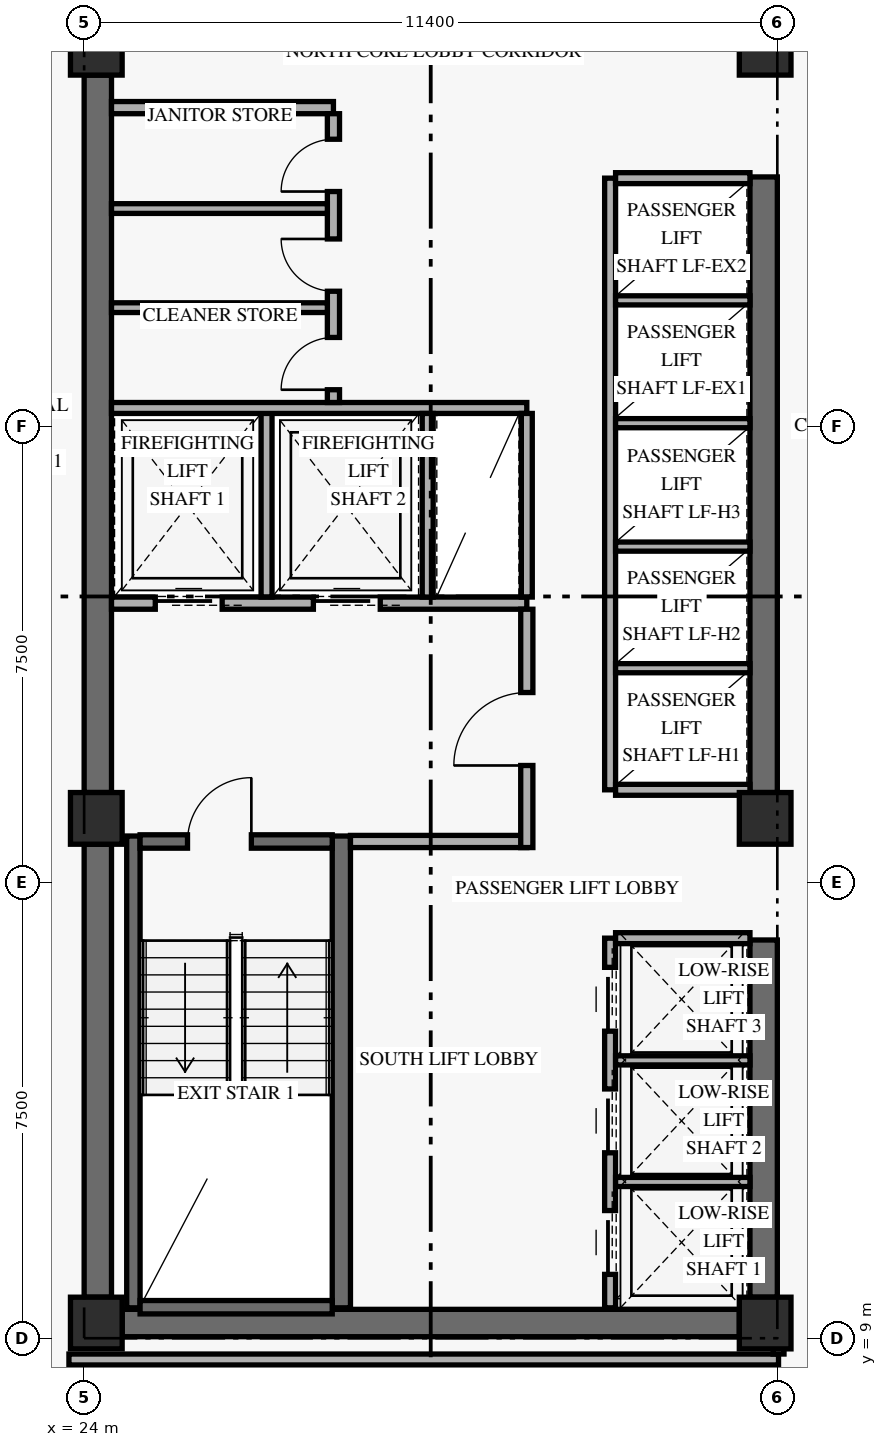
"""IFC4 building model, lengths in metres.
Left out: names, types, materials, properties, quantities, classifications, styles, units other than length and angle.
Written with IfcOpenShell. Run it as: python <this file> out.ifc"""

import sys

from ifc_helpers import new_model, si_unit, direction, frame, frame_2d, origin, origin_2d, place, context, subcontext, project, spatial, rectangle, extrude, element, fill, save


model = new_model("IFC4")
c1 = context("Model", 3, precision=1e-05, world=origin(), true_north=direction((0.0, 1.0)))
c2 = subcontext(c1, "Body", "Model", "MODEL_VIEW")
j1 = project(units=[si_unit("LENGTHUNIT", "METRE"), si_unit("PLANEANGLEUNIT", "RADIAN")], contexts=[c1])
p1 = place(None, origin())
s1 = spatial("IfcSite", under=j1, at=p1, CompositionType="ELEMENT")
p2 = place(p1, origin())
s2 = spatial("IfcBuilding", under=s1, at=p2, CompositionType="ELEMENT")
p3 = place(p2, frame((0.0, 0.0, 42.0)))
s3 = spatial("IfcBuildingStorey", under=s2, at=p3, CompositionType="ELEMENT", Elevation=42.0)
p4 = place(p3, frame((24.225, 9.675, 0.0), z_axis=(0.0, 0.0, 1.0), x_axis=(0.0, 1.0, 0.0)))
e1 = element("IfcWall", 1, at=p4, inside=s3, PredefinedType="SHEAR", context=c2, shape_type="SweptSolid", body=[
    extrude(rectangle(XDim=7.45, YDim=0.45, at=frame_2d((3.725, 0.0))), origin(), (0.0, 0.0, 1.0), 2.667),
])
p5 = place(p3, frame((24.225, 17.975, 0.0), z_axis=(0.0, 0.0, 1.0), x_axis=(0.0, 1.0, 0.0)))
e2 = element("IfcWall", 2, at=p5, inside=s3, PredefinedType="SHEAR", context=c2, shape_type="SweptSolid", body=[
    extrude(rectangle(XDim=11.8, YDim=0.45, at=frame_2d((5.9, 0.0))), origin(), (0.0, 0.0, 1.0), 2.667),
])
p6 = place(p3, frame((35.175, 9.675, 0.0), z_axis=(0.0, 0.0, 1.0), x_axis=(0.0, 1.0, 0.0)))
e3 = element("IfcWall", 3, at=p6, inside=s3, PredefinedType="SHEAR", context=c2, shape_type="SweptSolid", body=[
    extrude(rectangle(XDim=5.875, YDim=0.45, at=frame_2d((2.938, 0.0))), origin(), (0.0, 0.0, 1.0), 2.667),
])
p7 = place(p3, frame((35.175, 17.975, 0.0), z_axis=(0.0, 0.0, 1.0), x_axis=(0.0, 1.0, 0.0)))
e4 = element("IfcWall", 4, at=p7, inside=s3, PredefinedType="SHEAR", context=c2, shape_type="SweptSolid", body=[
    extrude(rectangle(XDim=10.125, YDim=0.45, at=frame_2d((5.062, 0.0))), origin(), (0.0, 0.0, 1.0), 2.667),
])
p8 = place(p3, frame((24.625, 9.25, 0.0), z_axis=(0.0, 0.0, 1.0), x_axis=(1.0, 0.0, 0.0)))
e5 = element("IfcWall", 5, at=p8, inside=s3, PredefinedType="SHEAR", context=c2, shape_type="SweptSolid", body=[
    extrude(rectangle(XDim=10.15, YDim=0.45, at=frame_2d((5.075, 0.0))), origin(), (0.0, 0.0, 1.0), 3.36),
])
p9 = place(p3, frame((24.81, 9.5, 0.0), z_axis=(0.0, 0.0, 1.0), x_axis=(0.0, 1.0, 0.0)))
e6 = element("IfcWall", 6, at=p9, inside=s3, PredefinedType="SHEAR", context=c2, shape_type="SweptSolid", body=[
    extrude(rectangle(XDim=7.76, YDim=0.22, at=frame_2d((3.88, 0.0))), origin(), (0.0, 0.0, 1.0), 3.36),
])
p10 = place(p3, frame((28.23, 9.5, 0.0), z_axis=(0.0, 0.0, 1.0), x_axis=(0.0, 1.0, 0.0)))
e7 = element("IfcWall", 7, at=p10, inside=s3, PredefinedType="SHEAR", context=c2, shape_type="SweptSolid", body=[
    extrude(rectangle(XDim=7.76, YDim=0.3, at=frame_2d((3.88, 0.0))), origin(), (0.0, 0.0, 1.0), 3.36),
])
p11 = place(p3, frame((24.92, 9.51, 0.0), z_axis=(0.0, 0.0, 1.0), x_axis=(1.0, 0.0, 0.0)))
e8 = element("IfcWall", 8, at=p11, inside=s3, PredefinedType="SHEAR", context=c2, shape_type="SweptSolid", body=[
    extrude(rectangle(XDim=3.16, YDim=0.22, at=frame_2d((1.58, 0.0))), origin(), (0.0, 0.0, 1.0), 3.36),
])
p12 = place(p3, frame((24.92, 17.17, 0.0), z_axis=(0.0, 0.0, 1.0), x_axis=(1.0, 0.0, 0.0)))
e9 = element("IfcWall", 9, at=p12, inside=s3, PredefinedType="SHEAR", context=c2, shape_type="SweptSolid", body=[
    extrude(rectangle(XDim=3.16, YDim=0.22, at=frame_2d((1.58, 0.0))), origin(), (0.0, 0.0, 1.0), 3.36),
])
p13 = place(p12, frame((0.78, 0.0, 0.0)))
e10 = element("IfcOpeningElement", 10, at=p13, cuts=e9, PredefinedType="OPENING", context=c2, shape_type="SweptSolid", body=[
    extrude(rectangle(XDim=1.05, YDim=2.15, at=frame_2d((0.525, 1.075))), frame((0.0, 0.12, 0.0), z_axis=(0.0, -1.0, 0.0), x_axis=(1.0, 0.0, 0.0)), (0.0, 0.0, 1.0), 0.24),
])
for number, where, z_axis, x_axis in (
    (11, (24.2, 9.25, 0.0), (0.0, 0.0, 1.0), (1.0, 0.0, 0.0)),
    (12, (24.2, 17.55, 0.0), (0.0, 0.0, 1.0), (1.0, 0.0, 0.0)),
    (13, (24.2, 30.2, 0.0), (0.0, 0.0, 1.0), (1.0, 0.0, 0.0)),
    (14, (35.2, 9.25, 0.0), (0.0, 0.0, 1.0), (1.0, 0.0, 0.0)),
    (15, (35.2, 17.55, 0.0), (0.0, 0.0, 1.0), (1.0, 0.0, 0.0)),
    (16, (35.2, 30.2, 0.0), (0.0, 0.0, 1.0), (1.0, 0.0, 0.0)),
):
    element("IfcColumn", number, at=place(p3, frame(where, z_axis=z_axis, x_axis=x_axis)), inside=s3, PredefinedType="COLUMN", context=c2, shape_type="SweptSolid", body=[
        extrude(rectangle(XDim=0.85, YDim=0.85, at=origin_2d()), origin(), (0.0, 0.0, 1.0), 3.6),
    ])
p14 = place(p3, frame((24.45, 21.09, 0.0), z_axis=(0.0, 0.0, 1.0), x_axis=(1.0, 0.0, 0.0)))
e17 = element("IfcWall", 17, at=p14, inside=s3, PredefinedType="STANDARD", context=c2, shape_type="SweptSolid", body=[
    extrude(rectangle(XDim=6.83, YDim=0.2, at=frame_2d((3.415, 0.0))), origin(), (0.0, 0.0, 1.0), 3.36),
])
p15 = place(p14, frame((0.72, 0.0, 0.0)))
e18 = element("IfcOpeningElement", 18, at=p15, cuts=e17, PredefinedType="OPENING", context=c2, shape_type="SweptSolid", body=[
    extrude(rectangle(XDim=1.1, YDim=2.2, at=frame_2d((0.55, 1.1))), frame((0.0, 0.11, 0.0), z_axis=(0.0, -1.0, 0.0), x_axis=(1.0, 0.0, 0.0)), (0.0, 0.0, 1.0), 0.22),
])
p16 = place(p14, frame((3.32, 0.0, 0.0)))
e19 = element("IfcOpeningElement", 19, at=p16, cuts=e17, PredefinedType="OPENING", context=c2, shape_type="SweptSolid", body=[
    extrude(rectangle(XDim=1.1, YDim=2.2, at=frame_2d((0.55, 1.1))), frame((0.0, 0.11, 0.0), z_axis=(0.0, -1.0, 0.0), x_axis=(1.0, 0.0, 0.0)), (0.0, 0.0, 1.0), 0.22),
])
p17 = place(p3, frame((28.38, 17.17, 0.0), z_axis=(0.0, 0.0, 1.0), x_axis=(1.0, 0.0, 0.0)))
e20 = element("IfcWall", 20, at=p17, inside=s3, PredefinedType="STANDARD", context=c2, shape_type="SweptSolid", body=[
    extrude(rectangle(XDim=2.9, YDim=0.2, at=frame_2d((1.45, 0.0))), origin(), (0.0, 0.0, 1.0), 3.36),
])
p18 = place(p3, frame((31.28, 17.07, 0.0), z_axis=(0.0, 0.0, 1.0), x_axis=(0.0, 1.0, 0.0)))
e21 = element("IfcWall", 21, at=p18, inside=s3, PredefinedType="STANDARD", context=c2, shape_type="SweptSolid", body=[
    extrude(rectangle(XDim=3.92, YDim=0.2, at=frame_2d((1.96, 0.0))), origin(), (0.0, 0.0, 1.0), 2.649),
])
p19 = place(p18, frame((1.35, 0.0, 0.0)))
e22 = element("IfcOpeningElement", 22, at=p19, cuts=e21, PredefinedType="OPENING", context=c2, shape_type="SweptSolid", body=[
    extrude(rectangle(XDim=1.2, YDim=2.15, at=frame_2d((0.6, 1.075))), frame((0.0, 0.11, 0.0), z_axis=(0.0, -1.0, 0.0), x_axis=(1.0, 0.0, 0.0)), (0.0, 0.0, 1.0), 0.22),
])
p20 = place(p3, frame((27.0, 21.19, 0.0), z_axis=(0.0, 0.0, 1.0), x_axis=(0.0, 1.0, 0.0)))
e23 = element("IfcWall", 23, at=p20, inside=s3, PredefinedType="STANDARD", context=c2, shape_type="SweptSolid", body=[
    extrude(rectangle(XDim=3.11, YDim=0.18, at=frame_2d((1.555, 0.0))), origin(), (0.0, 0.0, 1.0), 3.36),
])
p21 = place(p3, frame((24.45, 24.3, 0.0), z_axis=(0.0, 0.0, 1.0), x_axis=(1.0, 0.0, 0.0)))
e24 = element("IfcWall", 24, at=p21, inside=s3, PredefinedType="STANDARD", context=c2, shape_type="SweptSolid", body=[
    extrude(rectangle(XDim=6.83, YDim=0.18, at=frame_2d((3.415, 0.0))), origin(), (0.0, 0.0, 1.0), 3.36),
])
for number, where, z_axis, x_axis in (
    (25, (29.65, 21.19, 0.0), (0.0, 0.0, 1.0), (0.0, 1.0, 0.0)),
    (26, (31.28, 21.19, 0.0), (0.0, 0.0, 1.0), (0.0, 1.0, 0.0)),
):
    element("IfcWall", number, at=place(p3, frame(where, z_axis=z_axis, x_axis=x_axis)), inside=s3, PredefinedType="STANDARD", context=c2, shape_type="SweptSolid", body=[
        extrude(rectangle(XDim=3.02, YDim=0.18, at=frame_2d((1.51, 0.0))), origin(), (0.0, 0.0, 1.0), 3.36),
    ])
p22 = place(p3, frame((24.45, 29.24, 0.0), z_axis=(0.0, 0.0, 1.0), x_axis=(1.0, 0.0, 0.0)))
e27 = element("IfcWall", 27, at=p22, inside=s3, PredefinedType="STANDARD", context=c2, shape_type="SweptSolid", body=[
    extrude(rectangle(XDim=3.65, YDim=0.2, at=frame_2d((1.825, 0.0))), origin(), (0.0, 0.0, 1.0), 3.36),
])
p23 = place(p3, frame((28.1, 24.39, 0.0), z_axis=(0.0, 0.0, 1.0), x_axis=(0.0, 1.0, 0.0)))
e28 = element("IfcWall", 28, at=p23, inside=s3, PredefinedType="STANDARD", context=c2, shape_type="SweptSolid", body=[
    extrude(rectangle(XDim=4.75, YDim=0.2, at=frame_2d((2.375, 0.0))), origin(), (0.0, 0.0, 1.0), 3.36),
])
p24 = place(p23, frame((0.21, 0.0, 0.0)))
e29 = element("IfcOpeningElement", 29, at=p24, cuts=e28, PredefinedType="OPENING", context=c2, shape_type="SweptSolid", body=[
    extrude(rectangle(XDim=0.86, YDim=2.1, at=frame_2d((0.43, 1.05))), frame((0.0, 0.11, 0.0), z_axis=(0.0, -1.0, 0.0), x_axis=(1.0, 0.0, 0.0)), (0.0, 0.0, 1.0), 0.22),
])
p25 = place(p23, frame((1.83, 0.0, 0.0)))
e30 = element("IfcOpeningElement", 30, at=p25, cuts=e28, PredefinedType="OPENING", context=c2, shape_type="SweptSolid", body=[
    extrude(rectangle(XDim=0.86, YDim=2.1, at=frame_2d((0.43, 1.05))), frame((0.0, 0.11, 0.0), z_axis=(0.0, -1.0, 0.0), x_axis=(1.0, 0.0, 0.0)), (0.0, 0.0, 1.0), 0.22),
])
p26 = place(p23, frame((3.47, 0.0, 0.0)))
e31 = element("IfcOpeningElement", 31, at=p26, cuts=e28, PredefinedType="OPENING", context=c2, shape_type="SweptSolid", body=[
    extrude(rectangle(XDim=0.86, YDim=2.1, at=frame_2d((0.43, 1.05))), frame((0.0, 0.11, 0.0), z_axis=(0.0, -1.0, 0.0), x_axis=(1.0, 0.0, 0.0)), (0.0, 0.0, 1.0), 0.22),
])
for number, where, z_axis, x_axis in (
    (32, (24.45, 25.95, 0.0), (0.0, 0.0, 1.0), (1.0, 0.0, 0.0)),
    (33, (24.45, 27.58, 0.0), (0.0, 0.0, 1.0), (1.0, 0.0, 0.0)),
):
    element("IfcWall", number, at=place(p3, frame(where, z_axis=z_axis, x_axis=x_axis)), inside=s3, PredefinedType="PARTITIONING", context=c2, shape_type="SweptSolid", body=[
        extrude(rectangle(XDim=3.55, YDim=0.16, at=frame_2d((1.775, 0.0))), origin(), (0.0, 0.0, 1.0), 3.36),
    ])
p27 = place(p3, frame((32.65, 9.5, 0.0), z_axis=(0.0, 0.0, 1.0), x_axis=(0.0, 1.0, 0.0)))
e34 = element("IfcWall", 34, at=p27, inside=s3, PredefinedType="STANDARD", context=c2, shape_type="SweptSolid", body=[
    extrude(rectangle(XDim=6.08, YDim=0.18, at=frame_2d((3.04, 0.0))), origin(), (0.0, 0.0, 1.0), 3.36),
])
p28 = place(p27, frame((0.55, 0.0, 0.0)))
e35 = element("IfcOpeningElement", 35, at=p28, cuts=e34, PredefinedType="OPENING", context=c2, shape_type="SweptSolid", body=[
    extrude(rectangle(XDim=1.05, YDim=2.2, at=frame_2d((0.525, 1.1))), frame((0.0, 0.1, 0.0), z_axis=(0.0, -1.0, 0.0), x_axis=(1.0, 0.0, 0.0)), (0.0, 0.0, 1.0), 0.2),
])
p29 = place(p27, frame((2.55, 0.0, 0.0)))
e36 = element("IfcOpeningElement", 36, at=p29, cuts=e34, PredefinedType="OPENING", context=c2, shape_type="SweptSolid", body=[
    extrude(rectangle(XDim=1.05, YDim=2.2, at=frame_2d((0.525, 1.1))), frame((0.0, 0.1, 0.0), z_axis=(0.0, -1.0, 0.0), x_axis=(1.0, 0.0, 0.0)), (0.0, 0.0, 1.0), 0.2),
])
p30 = place(p27, frame((4.55, 0.0, 0.0)))
e37 = element("IfcOpeningElement", 37, at=p30, cuts=e34, PredefinedType="OPENING", context=c2, shape_type="SweptSolid", body=[
    extrude(rectangle(XDim=1.05, YDim=2.2, at=frame_2d((0.525, 1.1))), frame((0.0, 0.1, 0.0), z_axis=(0.0, -1.0, 0.0), x_axis=(1.0, 0.0, 0.0)), (0.0, 0.0, 1.0), 0.2),
])
p31 = place(p3, frame((32.74, 15.58, 0.0), z_axis=(0.0, 0.0, 1.0), x_axis=(1.0, 0.0, 0.0)))
e38 = element("IfcWall", 38, at=p31, inside=s3, PredefinedType="STANDARD", context=c2, shape_type="SweptSolid", body=[
    extrude(rectangle(XDim=2.21, YDim=0.18, at=frame_2d((1.105, 0.0))), origin(), (0.0, 0.0, 1.0), 3.36),
])
for number, where, z_axis, x_axis in (
    (39, (32.74, 11.57, 0.0), (0.0, 0.0, 1.0), (1.0, 0.0, 0.0)),
    (40, (32.74, 13.57, 0.0), (0.0, 0.0, 1.0), (1.0, 0.0, 0.0)),
):
    element("IfcWall", number, at=place(p3, frame(where, z_axis=z_axis, x_axis=x_axis)), inside=s3, PredefinedType="STANDARD", context=c2, shape_type="SweptSolid", body=[
        extrude(rectangle(XDim=2.21, YDim=0.15, at=frame_2d((1.105, 0.0))), origin(), (0.0, 0.0, 1.0), 3.36),
    ])
p32 = place(p3, frame((32.65, 18.02, 0.0), z_axis=(0.0, 0.0, 1.0), x_axis=(0.0, 1.0, 0.0)))
e41 = element("IfcWall", 41, at=p32, inside=s3, PredefinedType="STANDARD", context=c2, shape_type="SweptSolid", body=[
    extrude(rectangle(XDim=10.06, YDim=0.18, at=frame_2d((5.03, 0.0))), origin(), (0.0, 0.0, 1.0), 3.36),
])
for number, where, z_axis, x_axis in (
    (42, (32.74, 18.02, 0.0), (0.0, 0.0, 1.0), (1.0, 0.0, 0.0)),
    (43, (32.74, 28.08, 0.0), (0.0, 0.0, 1.0), (1.0, 0.0, 0.0)),
):
    element("IfcWall", number, at=place(p3, frame(where, z_axis=z_axis, x_axis=x_axis)), inside=s3, PredefinedType="STANDARD", context=c2, shape_type="SweptSolid", body=[
        extrude(rectangle(XDim=2.21, YDim=0.18, at=frame_2d((1.105, 0.0))), origin(), (0.0, 0.0, 1.0), 3.36),
    ])
for number, where, z_axis, x_axis in (
    (44, (32.74, 20.02, 0.0), (0.0, 0.0, 1.0), (1.0, 0.0, 0.0)),
    (45, (32.74, 22.02, 0.0), (0.0, 0.0, 1.0), (1.0, 0.0, 0.0)),
    (46, (32.74, 24.05, 0.0), (0.0, 0.0, 1.0), (1.0, 0.0, 0.0)),
    (47, (32.74, 26.07, 0.0), (0.0, 0.0, 1.0), (1.0, 0.0, 0.0)),
):
    element("IfcWall", number, at=place(p3, frame(where, z_axis=z_axis, x_axis=x_axis)), inside=s3, PredefinedType="STANDARD", context=c2, shape_type="SweptSolid", body=[
        extrude(rectangle(XDim=2.21, YDim=0.15, at=frame_2d((1.105, 0.0))), origin(), (0.0, 0.0, 1.0), 3.36),
    ])
p33 = place(p3, frame((23.75, 8.65, 0.0), z_axis=(0.0, 0.0, 1.0), x_axis=(1.0, 0.0, 0.0)))
e48 = element("IfcWall", 48, at=p33, inside=s3, PredefinedType="STANDARD", context=c2, shape_type="SweptSolid", body=[
    extrude(rectangle(XDim=11.67, YDim=0.18, at=frame_2d((5.835, 0.0))), origin(), (0.0, 0.0, 1.0), 2.649),
])
p34 = place(p3, frame((35.42, 8.74, 0.0), z_axis=(0.0, 0.0, 1.0), x_axis=(0.0, 1.0, 0.0)))
e49 = element("IfcWall", 49, at=p34, inside=s3, PredefinedType="STANDARD", context=c2, shape_type="SweptSolid", body=[
    extrude(rectangle(XDim=0.51, YDim=0.18, at=frame_2d((0.255, 0.0))), origin(), (0.0, 0.0, 1.0), 3.36),
])
p35 = place(p13, frame((1.05, 0.0, 0.0), z_axis=(0.0, 0.0, 1.0), x_axis=(-1.0, 0.0, 0.0)))
e50 = element("IfcDoor", 50, at=p35, inside=s3, OperationType="SINGLE_SWING_LEFT", PredefinedType="DOOR", context=c2, shape_type="SweptSolid", body=[
    extrude(rectangle(XDim=1.05, YDim=2.15, at=frame_2d((0.525, 1.075))), frame((0.0, 0.025, 0.0), z_axis=(0.0, -1.0, 0.0), x_axis=(1.0, 0.0, 0.0)), (0.0, 0.0, 1.0), 0.05),
])
fill(e10, e50)
p36 = place(p15, origin())
e51 = element("IfcDoor", 51, at=p36, inside=s3, OperationType="SLIDING_TO_LEFT", PredefinedType="DOOR", context=c2, shape_type="SweptSolid", body=[
    extrude(rectangle(XDim=1.1, YDim=2.2, at=frame_2d((0.55, 1.1))), frame((0.0, 0.025, 0.0), z_axis=(0.0, -1.0, 0.0), x_axis=(1.0, 0.0, 0.0)), (0.0, 0.0, 1.0), 0.05),
])
fill(e18, e51)
p37 = place(p16, origin())
e52 = element("IfcDoor", 52, at=p37, inside=s3, OperationType="SLIDING_TO_LEFT", PredefinedType="DOOR", context=c2, shape_type="SweptSolid", body=[
    extrude(rectangle(XDim=1.1, YDim=2.2, at=frame_2d((0.55, 1.1))), frame((0.0, 0.025, 0.0), z_axis=(0.0, -1.0, 0.0), x_axis=(1.0, 0.0, 0.0)), (0.0, 0.0, 1.0), 0.05),
])
fill(e19, e52)
p38 = place(p19, origin())
e53 = element("IfcDoor", 53, at=p38, inside=s3, OperationType="SINGLE_SWING_LEFT", PredefinedType="DOOR", context=c2, shape_type="SweptSolid", body=[
    extrude(rectangle(XDim=1.2, YDim=2.15, at=frame_2d((0.6, 1.075))), frame((0.0, 0.025, 0.0), z_axis=(0.0, -1.0, 0.0), x_axis=(1.0, 0.0, 0.0)), (0.0, 0.0, 1.0), 0.05),
])
fill(e22, e53)
p39 = place(p24, origin())
e54 = element("IfcDoor", 54, at=p39, inside=s3, OperationType="SINGLE_SWING_LEFT", PredefinedType="DOOR", context=c2, shape_type="SweptSolid", body=[
    extrude(rectangle(XDim=0.86, YDim=2.1, at=frame_2d((0.43, 1.05))), frame((0.0, 0.025, 0.0), z_axis=(0.0, -1.0, 0.0), x_axis=(1.0, 0.0, 0.0)), (0.0, 0.0, 1.0), 0.05),
])
fill(e29, e54)
p40 = place(p25, origin())
e55 = element("IfcDoor", 55, at=p40, inside=s3, OperationType="SINGLE_SWING_RIGHT", PredefinedType="DOOR", context=c2, shape_type="SweptSolid", body=[
    extrude(rectangle(XDim=0.86, YDim=2.1, at=frame_2d((0.43, 1.05))), frame((0.0, 0.025, 0.0), z_axis=(0.0, -1.0, 0.0), x_axis=(1.0, 0.0, 0.0)), (0.0, 0.0, 1.0), 0.05),
])
fill(e30, e55)
p41 = place(p26, origin())
e56 = element("IfcDoor", 56, at=p41, inside=s3, OperationType="SINGLE_SWING_LEFT", PredefinedType="DOOR", context=c2, shape_type="SweptSolid", body=[
    extrude(rectangle(XDim=0.86, YDim=2.1, at=frame_2d((0.43, 1.05))), frame((0.0, 0.025, 0.0), z_axis=(0.0, -1.0, 0.0), x_axis=(1.0, 0.0, 0.0)), (0.0, 0.0, 1.0), 0.05),
])
fill(e31, e56)
p42 = place(p28, origin())
e57 = element("IfcDoor", 57, at=p42, inside=s3, OperationType="SLIDING_TO_LEFT", PredefinedType="DOOR", context=c2, shape_type="SweptSolid", body=[
    extrude(rectangle(XDim=1.05, YDim=2.2, at=frame_2d((0.525, 1.1))), frame((0.0, 0.025, 0.0), z_axis=(0.0, -1.0, 0.0), x_axis=(1.0, 0.0, 0.0)), (0.0, 0.0, 1.0), 0.05),
])
fill(e35, e57)
p43 = place(p29, origin())
e58 = element("IfcDoor", 58, at=p43, inside=s3, OperationType="SLIDING_TO_LEFT", PredefinedType="DOOR", context=c2, shape_type="SweptSolid", body=[
    extrude(rectangle(XDim=1.05, YDim=2.2, at=frame_2d((0.525, 1.1))), frame((0.0, 0.025, 0.0), z_axis=(0.0, -1.0, 0.0), x_axis=(1.0, 0.0, 0.0)), (0.0, 0.0, 1.0), 0.05),
])
fill(e36, e58)
p44 = place(p30, origin())
e59 = element("IfcDoor", 59, at=p44, inside=s3, OperationType="SLIDING_TO_LEFT", PredefinedType="DOOR", context=c2, shape_type="SweptSolid", body=[
    extrude(rectangle(XDim=1.05, YDim=2.2, at=frame_2d((0.525, 1.1))), frame((0.0, 0.025, 0.0), z_axis=(0.0, -1.0, 0.0), x_axis=(1.0, 0.0, 0.0)), (0.0, 0.0, 1.0), 0.05),
])
fill(e37, e59)
save(model, sys.argv[1])
